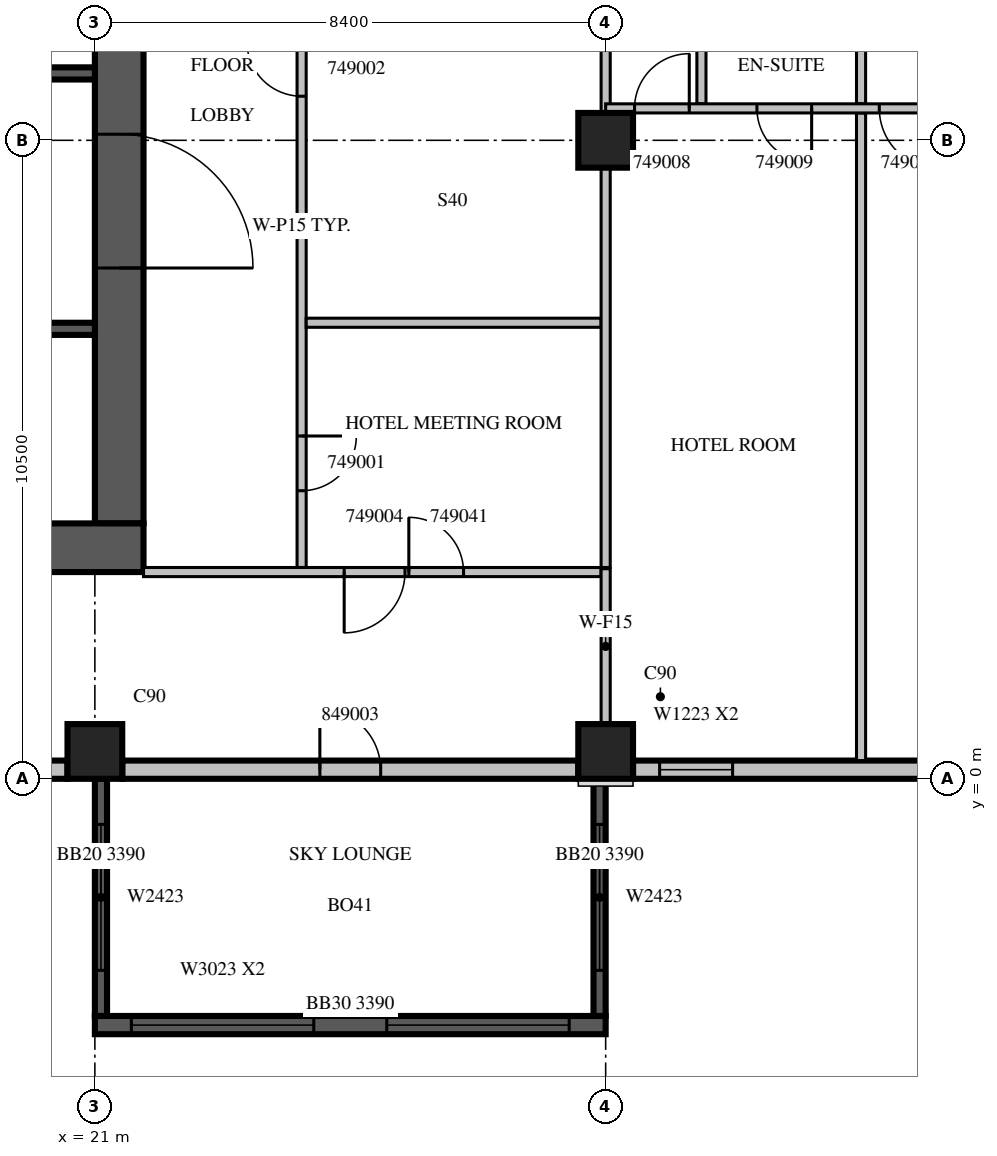
"""IFC4 building model, lengths in metres.
Left out: names, types, materials, properties, quantities, classifications, styles, units other than length and angle.
Written with IfcOpenShell. Run it as: python <this file> out.ifc"""

import sys

from ifc_helpers import new_model, si_unit, direction, frame, frame_2d, origin, origin_2d, place, context, subcontext, project, spatial, rectangle, extrude, source, transform, mapped, element, fill, save


model = new_model("IFC4")
c1 = context("Model", 3, precision=1e-05, world=origin(), true_north=direction((0.0, 1.0)))
c2 = subcontext(c1, "Body", "Model", "MODEL_VIEW")
j1 = project(units=[si_unit("LENGTHUNIT", "METRE"), si_unit("PLANEANGLEUNIT", "RADIAN")], contexts=[c1])
p1 = place(None, origin())
s1 = spatial("IfcSite", under=j1, at=p1, CompositionType="ELEMENT")
p2 = place(p1, origin())
s2 = spatial("IfcBuilding", under=s1, at=p2, CompositionType="ELEMENT")
p3 = place(p2, frame((0.0, 0.0, 219.6)))
s3 = spatial("IfcBuildingStorey", under=s2, at=p3, CompositionType="ELEMENT", Elevation=219.6)
m1 = source(origin(), c2, "Body", "SweptSolid", [
    extrude(rectangle(XDim=0.9, YDim=0.9, at=origin_2d()), origin(), (0.0, 0.0, 1.0), 3.8),
])
for number, where, z_axis, x_axis in (
    (1, (21.0, 0.45, 0.0), (0.0, 0.0, 1.0), (1.0, 0.0, 0.0)),
    (2, (29.4, 0.45, 0.0), (0.0, 0.0, 1.0), (1.0, 0.0, 0.0)),
    (3, (29.4, 10.5, 0.0), (0.0, 0.0, 1.0), (1.0, 0.0, 0.0)),
):
    element("IfcColumn", number, at=place(p3, frame(where, z_axis=z_axis, x_axis=x_axis)), inside=s3, PredefinedType="COLUMN", context=c2, shape_type="MappedRepresentation", body=[
        mapped(m1, transform((0.0, 0.0, 0.0), scale=1.0)),
    ])
m2 = source(origin(), c2, "Body", "SweptSolid", [
    extrude(rectangle(XDim=16.8, YDim=0.8, at=frame_2d((8.4, 0.0))), origin(), (0.0, 0.0, 1.0), 3.8),
])
p4 = place(p3, frame((21.4, 4.2, 0.0), z_axis=(0.0, 0.0, 1.0), x_axis=(0.0, 1.0, 0.0)))
e4 = element("IfcWall", 4, at=p4, inside=s3, PredefinedType="SHEAR", context=c2, shape_type="MappedRepresentation", body=[
    mapped(m2, transform((0.0, 0.0, 0.0), scale=1.0)),
])
m3 = source(origin(), c2, "Body", "SweptSolid", [
    extrude(rectangle(XDim=2.2, YDim=2.1, at=frame_2d((1.1, 1.05))), frame((0.0, 0.41, 0.0), z_axis=(0.0, -1.0, 0.0), x_axis=(1.0, 0.0, 0.0)), (0.0, 0.0, 1.0), 0.82),
])
p5 = place(p4, frame((4.2, 0.0, 0.0)))
e5 = element("IfcOpeningElement", 5, at=p5, cuts=e4, PredefinedType="OPENING", context=c2, shape_type="MappedRepresentation", body=[
    mapped(m3, transform((0.0, 0.0, 0.0), scale=1.0)),
])
m4 = source(origin(), c2, "Body", "SweptSolid", [
    extrude(rectangle(XDim=1.2, YDim=2.1, at=frame_2d((0.6, 1.05))), frame((0.0, 0.41, 0.0), z_axis=(0.0, -1.0, 0.0), x_axis=(1.0, 0.0, 0.0)), (0.0, 0.0, 1.0), 0.82),
])
p6 = place(p4, frame((14.7, 0.0, 0.0)))
e6 = element("IfcOpeningElement", 6, at=p6, cuts=e4, PredefinedType="OPENING", context=c2, shape_type="MappedRepresentation", body=[
    mapped(m4, transform((0.0, 0.0, 0.0), scale=1.0)),
])
m5 = source(origin(), c2, "Body", "SweptSolid", [
    extrude(rectangle(XDim=17.6, YDim=0.8, at=frame_2d((8.8, 0.0))), origin(), (0.0, 0.0, 1.0), 3.8),
])
p7 = place(p3, frame((4.2, 3.8, 0.0), z_axis=(0.0, 0.0, 1.0), x_axis=(1.0, 0.0, 0.0)))
e7 = element("IfcWall", 7, at=p7, inside=s3, PredefinedType="SHEAR", context=c2, shape_type="MappedRepresentation", body=[
    mapped(m5, transform((0.0, 0.0, 0.0), scale=1.0)),
])
m6 = source(origin(), c2, "Body", "SweptSolid", [
    extrude(rectangle(XDim=0.9, YDim=2.1, at=frame_2d((0.45, 1.05))), frame((0.0, 0.41, 0.0), z_axis=(0.0, -1.0, 0.0), x_axis=(1.0, 0.0, 0.0)), (0.0, 0.0, 1.0), 0.82),
])
p8 = place(p7, frame((12.75, 0.0, 0.0)))
e8 = element("IfcOpeningElement", 8, at=p8, cuts=e7, PredefinedType="OPENING", context=c2, shape_type="MappedRepresentation", body=[
    mapped(m6, transform((0.0, 0.0, 0.0), scale=1.0)),
])
m7 = source(origin(), c2, "Body", "SweptSolid", [
    extrude(rectangle(XDim=9.6, YDim=0.3, at=frame_2d((4.8, 0.0))), origin(), (0.0, 0.0, 1.0), 3.4),
])
p9 = place(p3, frame((10.95, 0.15, 0.0), z_axis=(0.0, 0.0, 1.0), x_axis=(1.0, 0.0, 0.0)))
e9 = element("IfcWall", 9, at=p9, inside=s3, PredefinedType="STANDARD", context=c2, shape_type="MappedRepresentation", body=[
    mapped(m7, transform((0.0, 0.0, 0.0), scale=1.0)),
])
m8 = source(origin(), c2, "Body", "SweptSolid", [
    extrude(rectangle(XDim=3.6, YDim=2.3, at=frame_2d((1.8, 1.15))), frame((0.0, 0.16, 0.0), z_axis=(0.0, -1.0, 0.0), x_axis=(1.0, 0.0, 0.0)), (0.0, 0.0, 1.0), 0.32),
])
p10 = place(p9, frame((5.625, 0.0, 0.6)))
e10 = element("IfcOpeningElement", 10, at=p10, cuts=e9, PredefinedType="OPENING", context=c2, shape_type="MappedRepresentation", body=[
    mapped(m8, transform((0.0, 0.0, 0.0), scale=1.0)),
])
m9 = source(origin(), c2, "Body", "SweptSolid", [
    extrude(rectangle(XDim=1.0, YDim=2.1, at=frame_2d((0.5, 1.05))), frame((0.0, 0.16, 0.0), z_axis=(0.0, -1.0, 0.0), x_axis=(1.0, 0.0, 0.0)), (0.0, 0.0, 1.0), 0.32),
])
p11 = place(p9, frame((1.675, 0.0, 0.0)))
e11 = element("IfcOpeningElement", 11, at=p11, cuts=e9, PredefinedType="OPENING", context=c2, shape_type="MappedRepresentation", body=[
    mapped(m9, transform((0.0, 0.0, 0.0), scale=1.0)),
])
m10 = source(origin(), c2, "Body", "SweptSolid", [
    extrude(rectangle(XDim=7.5, YDim=0.3, at=frame_2d((3.75, 0.0))), origin(), (0.0, 0.0, 1.0), 3.4),
])
p12 = place(p3, frame((21.45, 0.15, 0.0), z_axis=(0.0, 0.0, 1.0), x_axis=(1.0, 0.0, 0.0)))
e12 = element("IfcWall", 12, at=p12, inside=s3, PredefinedType="STANDARD", context=c2, shape_type="MappedRepresentation", body=[
    mapped(m10, transform((0.0, 0.0, 0.0), scale=1.0)),
])
p13 = place(p12, frame((3.25, 0.0, 0.0)))
e13 = element("IfcOpeningElement", 13, at=p13, cuts=e12, PredefinedType="OPENING", context=c2, shape_type="MappedRepresentation", body=[
    mapped(m9, transform((0.0, 0.0, 0.0), scale=1.0)),
])
p14 = place(p3, frame((29.85, 0.15, 0.0), z_axis=(0.0, 0.0, 1.0), x_axis=(1.0, 0.0, 0.0)))
e14 = element("IfcWall", 14, at=p14, inside=s3, PredefinedType="STANDARD", context=c2, shape_type="MappedRepresentation", body=[
    mapped(m10, transform((0.0, 0.0, 0.0), scale=1.0)),
])
m11 = source(origin(), c2, "Body", "SweptSolid", [
    extrude(rectangle(XDim=1.2, YDim=2.3, at=frame_2d((0.6, 1.15))), frame((0.0, 0.16, 0.0), z_axis=(0.0, -1.0, 0.0), x_axis=(1.0, 0.0, 0.0)), (0.0, 0.0, 1.0), 0.32),
])
p15 = place(p14, frame((0.438, 0.0, 0.6)))
e15 = element("IfcOpeningElement", 15, at=p15, cuts=e14, PredefinedType="OPENING", context=c2, shape_type="MappedRepresentation", body=[
    mapped(m11, transform((0.0, 0.0, 0.0), scale=1.0)),
])
p16 = place(p14, frame((5.963, 0.0, 0.6)))
e16 = element("IfcOpeningElement", 16, at=p16, cuts=e14, PredefinedType="OPENING", context=c2, shape_type="MappedRepresentation", body=[
    mapped(m11, transform((0.0, 0.0, 0.0), scale=1.0)),
])
p17 = place(p3, frame((21.0, -4.05, 0.0), z_axis=(0.0, 0.0, 1.0), x_axis=(1.0, 0.0, 0.0)))
e17 = element("IfcWall", 17, at=p17, inside=s3, PredefinedType="SOLIDWALL", context=c2, shape_type="SweptSolid", body=[
    extrude(rectangle(XDim=8.4, YDim=0.3, at=frame_2d((4.2, 0.0))), origin(), (0.0, 0.0, 1.0), 3.39),
])
m12 = source(origin(), c2, "Body", "SweptSolid", [
    extrude(rectangle(XDim=3.0, YDim=2.3, at=frame_2d((1.5, 1.15))), frame((0.0, 0.16, 0.0), z_axis=(0.0, -1.0, 0.0), x_axis=(1.0, 0.0, 0.0)), (0.0, 0.0, 1.0), 0.32),
])
p18 = place(p17, frame((0.6, 0.0, 0.6)))
e18 = element("IfcOpeningElement", 18, at=p18, cuts=e17, PredefinedType="OPENING", context=c2, shape_type="MappedRepresentation", body=[
    mapped(m12, transform((0.0, 0.0, 0.0), scale=1.0)),
])
p19 = place(p17, frame((4.8, 0.0, 0.6)))
e19 = element("IfcOpeningElement", 19, at=p19, cuts=e17, PredefinedType="OPENING", context=c2, shape_type="MappedRepresentation", body=[
    mapped(m12, transform((0.0, 0.0, 0.0), scale=1.0)),
])
m13 = source(origin(), c2, "Body", "SweptSolid", [
    extrude(rectangle(XDim=3.9, YDim=0.2, at=frame_2d((1.95, 0.0))), origin(), (0.0, 0.0, 1.0), 3.39),
])
p20 = place(p3, frame((21.1, 0.0, 0.0), z_axis=(0.0, 0.0, 1.0), x_axis=(0.0, -1.0, 0.0)))
e20 = element("IfcWall", 20, at=p20, inside=s3, PredefinedType="SOLIDWALL", context=c2, shape_type="MappedRepresentation", body=[
    mapped(m13, transform((0.0, 0.0, 0.0), scale=1.0)),
])
m14 = source(origin(), c2, "Body", "SweptSolid", [
    extrude(rectangle(XDim=2.4, YDim=2.3, at=frame_2d((1.2, 1.15))), frame((0.0, 0.11, 0.0), z_axis=(0.0, -1.0, 0.0), x_axis=(1.0, 0.0, 0.0)), (0.0, 0.0, 1.0), 0.22),
])
p21 = place(p20, frame((0.75, 0.0, 0.6)))
e21 = element("IfcOpeningElement", 21, at=p21, cuts=e20, PredefinedType="OPENING", context=c2, shape_type="MappedRepresentation", body=[
    mapped(m14, transform((0.0, 0.0, 0.0), scale=1.0)),
])
p22 = place(p3, frame((29.3, 0.0, 0.0), z_axis=(0.0, 0.0, 1.0), x_axis=(0.0, -1.0, 0.0)))
e22 = element("IfcWall", 22, at=p22, inside=s3, PredefinedType="SOLIDWALL", context=c2, shape_type="MappedRepresentation", body=[
    mapped(m13, transform((0.0, 0.0, 0.0), scale=1.0)),
])
p23 = place(p22, frame((0.75, 0.0, 0.6)))
e23 = element("IfcOpeningElement", 23, at=p23, cuts=e22, PredefinedType="OPENING", context=c2, shape_type="MappedRepresentation", body=[
    mapped(m14, transform((0.0, 0.0, 0.0), scale=1.0)),
])
m15 = source(origin(), c2, "Body", "SweptSolid", [
    extrude(rectangle(XDim=2.4, YDim=0.2, at=frame_2d((1.2, 0.0))), origin(), (0.0, 0.0, 1.0), 3.8),
])
p24 = place(p3, frame((18.6, 7.4, 0.0), z_axis=(0.0, 0.0, 1.0), x_axis=(1.0, 0.0, 0.0)))
e24 = element("IfcWall", 24, at=p24, inside=s3, PredefinedType="SOLIDWALL", context=c2, shape_type="MappedRepresentation", body=[
    mapped(m15, transform((0.0, 0.0, 0.0), scale=1.0)),
])
m16 = source(origin(), c2, "Body", "SweptSolid", [
    extrude(rectangle(XDim=9.6, YDim=0.2, at=frame_2d((4.8, 0.0))), origin(), (0.0, 0.0, 1.0), 3.8),
])
p25 = place(p3, frame((11.4, 11.6, 0.0), z_axis=(0.0, 0.0, 1.0), x_axis=(1.0, 0.0, 0.0)))
e25 = element("IfcWall", 25, at=p25, inside=s3, PredefinedType="SOLIDWALL", context=c2, shape_type="MappedRepresentation", body=[
    mapped(m16, transform((0.0, 0.0, 0.0), scale=1.0)),
])
m17 = source(origin(), c2, "Body", "SweptSolid", [
    extrude(rectangle(XDim=11.225, YDim=0.15, at=frame_2d((5.612, 0.0))), origin(), (0.0, 0.0, 1.0), 3.4),
])
p26 = place(p3, frame((24.4, 14.7, 0.0), z_axis=(0.0, 0.0, 1.0), x_axis=(0.0, -1.0, 0.0)))
e26 = element("IfcWall", 26, at=p26, inside=s3, PredefinedType="PARTITIONING", context=c2, shape_type="MappedRepresentation", body=[
    mapped(m17, transform((0.0, 0.0, 0.0), scale=1.0)),
])
m18 = source(origin(), c2, "Body", "SweptSolid", [
    extrude(rectangle(XDim=0.9, YDim=2.1, at=frame_2d((0.45, 1.05))), frame((0.0, 0.085, 0.0), z_axis=(0.0, -1.0, 0.0), x_axis=(1.0, 0.0, 0.0)), (0.0, 0.0, 1.0), 0.17),
])
p27 = place(p26, frame((9.062, 0.0, 0.0)))
e27 = element("IfcOpeningElement", 27, at=p27, cuts=e26, PredefinedType="OPENING", context=c2, shape_type="MappedRepresentation", body=[
    mapped(m18, transform((0.0, 0.0, 0.0), scale=1.0)),
])
p28 = place(p26, frame((2.575, 0.0, 0.0)))
e28 = element("IfcOpeningElement", 28, at=p28, cuts=e26, PredefinedType="OPENING", context=c2, shape_type="MappedRepresentation", body=[
    mapped(m18, transform((0.0, 0.0, 0.0), scale=1.0)),
])
m19 = source(origin(), c2, "Body", "SweptSolid", [
    extrude(rectangle(XDim=4.85, YDim=0.15, at=frame_2d((2.425, 0.0))), origin(), (0.0, 0.0, 1.0), 3.4),
])
p29 = place(p3, frame((29.325, 7.5, 0.0), z_axis=(0.0, 0.0, 1.0), x_axis=(-1.0, 0.0, 0.0)))
e29 = element("IfcWall", 29, at=p29, inside=s3, PredefinedType="PARTITIONING", context=c2, shape_type="MappedRepresentation", body=[
    mapped(m19, transform((0.0, 0.0, 0.0), scale=1.0)),
])
m20 = source(origin(), c2, "Body", "SweptSolid", [
    extrude(rectangle(XDim=6.576, YDim=0.15, at=frame_2d((3.288, 0.0))), origin(), (0.0, 0.0, 1.0), 3.4),
])
p30 = place(p3, frame((29.4, 3.475, 0.0), z_axis=(0.0, 0.0, 1.0), x_axis=(0.0, 1.0, 0.0)))
e30 = element("IfcWall", 30, at=p30, inside=s3, PredefinedType="PARTITIONING", context=c2, shape_type="MappedRepresentation", body=[
    mapped(m20, transform((0.0, 0.0, 0.0), scale=1.0)),
])
m21 = source(origin(), c2, "Body", "SweptSolid", [
    extrude(rectangle(XDim=3.751, YDim=0.15, at=frame_2d((1.875, 0.0))), origin(), (0.0, 0.0, 1.0), 3.4),
])
p31 = place(p3, frame((29.4, 10.949, 0.0), z_axis=(0.0, 0.0, 1.0), x_axis=(0.0, 1.0, 0.0)))
e31 = element("IfcWall", 31, at=p31, inside=s3, PredefinedType="PARTITIONING", context=c2, shape_type="MappedRepresentation", body=[
    mapped(m21, transform((0.0, 0.0, 0.0), scale=1.0)),
])
m22 = source(origin(), c2, "Body", "SweptSolid", [
    extrude(rectangle(XDim=7.525, YDim=0.15, at=frame_2d((3.763, 0.0))), origin(), (0.0, 0.0, 1.0), 3.4),
])
p32 = place(p3, frame((21.8, 3.4, 0.0), z_axis=(0.0, 0.0, 1.0), x_axis=(1.0, 0.0, 0.0)))
e32 = element("IfcWall", 32, at=p32, inside=s3, PredefinedType="PARTITIONING", context=c2, shape_type="MappedRepresentation", body=[
    mapped(m22, transform((0.0, 0.0, 0.0), scale=1.0)),
])
m23 = source(origin(), c2, "Body", "SweptSolid", [
    extrude(rectangle(XDim=1.0, YDim=2.1, at=frame_2d((0.5, 1.05))), frame((0.0, 0.085, 0.0), z_axis=(0.0, -1.0, 0.0), x_axis=(1.0, 0.0, 0.0)), (0.0, 0.0, 1.0), 0.17),
])
p33 = place(p32, frame((3.3, 0.0, 0.0)))
e33 = element("IfcOpeningElement", 33, at=p33, cuts=e32, PredefinedType="OPENING", context=c2, shape_type="MappedRepresentation", body=[
    mapped(m23, transform((0.0, 0.0, 0.0), scale=1.0)),
])
p34 = place(p32, frame((4.363, 0.0, 0.0)))
e34 = element("IfcOpeningElement", 34, at=p34, cuts=e32, PredefinedType="OPENING", context=c2, shape_type="MappedRepresentation", body=[
    mapped(m18, transform((0.0, 0.0, 0.0), scale=1.0)),
])
m24 = source(origin(), c2, "Body", "SweptSolid", [
    extrude(rectangle(XDim=10.65, YDim=0.15, at=frame_2d((5.325, 0.0))), origin(), (0.0, 0.0, 1.0), 3.4),
])
p35 = place(p3, frame((33.6, 0.3, 0.0), z_axis=(0.0, 0.0, 1.0), x_axis=(0.0, 1.0, 0.0)))
e35 = element("IfcWall", 35, at=p35, inside=s3, PredefinedType="PARTITIONING", context=c2, shape_type="MappedRepresentation", body=[
    mapped(m24, transform((0.0, 0.0, 0.0), scale=1.0)),
])
m25 = source(origin(), c2, "Body", "SweptSolid", [
    extrude(rectangle(XDim=3.6, YDim=0.15, at=frame_2d((1.8, 0.0))), origin(), (0.0, 0.0, 1.0), 3.4),
])
for number, where, z_axis, x_axis in (
    (36, (30.975, 11.1, 0.0), (0.0, 0.0, 1.0), (0.0, 1.0, 0.0)),
    (37, (33.6, 11.1, 0.0), (0.0, 0.0, 1.0), (0.0, 1.0, 0.0)),
):
    element("IfcWall", number, at=place(p3, frame(where, z_axis=z_axis, x_axis=x_axis)), inside=s3, PredefinedType="PARTITIONING", context=c2, shape_type="MappedRepresentation", body=[
        mapped(m25, transform((0.0, 0.0, 0.0), scale=1.0)),
    ])
m26 = source(origin(), c2, "Body", "SweptSolid", [
    extrude(rectangle(XDim=2.556, YDim=0.15, at=frame_2d((1.278, 0.0))), origin(), (0.0, 0.0, 1.0), 3.4),
])
p36 = place(p3, frame((29.4, 0.899, 0.0), z_axis=(0.0, 0.0, 1.0), x_axis=(0.0, 1.0, 0.0)))
e38 = element("IfcWall", 38, at=p36, inside=s3, PredefinedType="PARTITIONING", context=c2, shape_type="MappedRepresentation", body=[
    mapped(m26, transform((0.0, 0.0, 0.0), scale=1.0)),
])
m27 = source(origin(), c2, "Body", "SweptSolid", [
    extrude(rectangle(XDim=8.4, YDim=0.15, at=frame_2d((4.2, 0.0))), origin(), (0.0, 0.0, 1.0), 3.4),
])
p37 = place(p3, frame((37.8, 11.025, 0.0), z_axis=(0.0, 0.0, 1.0), x_axis=(-1.0, 0.0, 0.0)))
e39 = element("IfcWall", 39, at=p37, inside=s3, PredefinedType="PARTITIONING", context=c2, shape_type="MappedRepresentation", body=[
    mapped(m27, transform((0.0, 0.0, 0.0), scale=1.0)),
])
p38 = place(p37, frame((7.025, 0.0, 0.0)))
e40 = element("IfcOpeningElement", 40, at=p38, cuts=e39, PredefinedType="OPENING", context=c2, shape_type="MappedRepresentation", body=[
    mapped(m18, transform((0.0, 0.0, 0.0), scale=1.0)),
])
p39 = place(p37, frame((5.013, 0.0, 0.0)))
e41 = element("IfcOpeningElement", 41, at=p39, cuts=e39, PredefinedType="OPENING", context=c2, shape_type="MappedRepresentation", body=[
    mapped(m18, transform((0.0, 0.0, 0.0), scale=1.0)),
])
p40 = place(p37, frame((2.9, 0.0, 0.0)))
e42 = element("IfcOpeningElement", 42, at=p40, cuts=e39, PredefinedType="OPENING", context=c2, shape_type="MappedRepresentation", body=[
    mapped(m23, transform((0.0, 0.0, 0.0), scale=1.0)),
])
p41 = place(p37, frame((1.087, 0.0, 0.0)))
e43 = element("IfcOpeningElement", 43, at=p41, cuts=e39, PredefinedType="OPENING", context=c2, shape_type="MappedRepresentation", body=[
    mapped(m18, transform((0.0, 0.0, 0.0), scale=1.0)),
])
m28 = source(origin(), c2, "Body", "SweptSolid", [
    extrude(rectangle(XDim=1.2, YDim=2.3, at=frame_2d((0.6, 1.15))), frame((0.0, 0.03, 0.0), z_axis=(0.0, -1.0, 0.0), x_axis=(1.0, 0.0, 0.0)), (0.0, 0.0, 1.0), 0.06),
])
p42 = place(p15, origin())
e44 = element("IfcWindow", 44, at=p42, inside=s3, PartitioningType="SINGLE_PANEL", PredefinedType="WINDOW", context=c2, shape_type="MappedRepresentation", body=[
    mapped(m28, transform((0.0, 0.0, 0.0), scale=1.0)),
])
fill(e15, e44)
m29 = source(origin(), c2, "Body", "SweptSolid", [
    extrude(rectangle(XDim=3.0, YDim=2.3, at=frame_2d((1.5, 1.15))), frame((0.0, 0.03, 0.0), z_axis=(0.0, -1.0, 0.0), x_axis=(1.0, 0.0, 0.0)), (0.0, 0.0, 1.0), 0.06),
])
p43 = place(p18, origin())
e45 = element("IfcWindow", 45, at=p43, inside=s3, PartitioningType="SINGLE_PANEL", PredefinedType="WINDOW", context=c2, shape_type="MappedRepresentation", body=[
    mapped(m29, transform((0.0, 0.0, 0.0), scale=1.0)),
])
fill(e18, e45)
p44 = place(p19, origin())
e46 = element("IfcWindow", 46, at=p44, inside=s3, PartitioningType="SINGLE_PANEL", PredefinedType="WINDOW", context=c2, shape_type="MappedRepresentation", body=[
    mapped(m29, transform((0.0, 0.0, 0.0), scale=1.0)),
])
fill(e19, e46)
m30 = source(origin(), c2, "Body", "SweptSolid", [
    extrude(rectangle(XDim=2.4, YDim=2.3, at=frame_2d((1.2, 1.15))), frame((0.0, 0.03, 0.0), z_axis=(0.0, -1.0, 0.0), x_axis=(1.0, 0.0, 0.0)), (0.0, 0.0, 1.0), 0.06),
])
p45 = place(p21, origin())
e47 = element("IfcWindow", 47, at=p45, inside=s3, PartitioningType="SINGLE_PANEL", PredefinedType="WINDOW", context=c2, shape_type="MappedRepresentation", body=[
    mapped(m30, transform((0.0, 0.0, 0.0), scale=1.0)),
])
fill(e21, e47)
p46 = place(p23, origin())
e48 = element("IfcWindow", 48, at=p46, inside=s3, PartitioningType="SINGLE_PANEL", PredefinedType="WINDOW", context=c2, shape_type="MappedRepresentation", body=[
    mapped(m30, transform((0.0, 0.0, 0.0), scale=1.0)),
])
fill(e23, e48)
m31 = source(origin(), c2, "Body", "SweptSolid", [
    extrude(rectangle(XDim=2.2, YDim=2.1, at=frame_2d((1.1, 1.05))), frame((0.0, 0.025, 0.0), z_axis=(0.0, -1.0, 0.0), x_axis=(1.0, 0.0, 0.0)), (0.0, 0.0, 1.0), 0.05),
])
p47 = place(p5, origin())
e49 = element("IfcDoor", 49, at=p47, inside=s3, OperationType="DOUBLE_DOOR_SINGLE_SWING", PredefinedType="DOOR", context=c2, shape_type="MappedRepresentation", body=[
    mapped(m31, transform((0.0, 0.0, 0.0), scale=1.0)),
])
fill(e5, e49)
m32 = source(origin(), c2, "Body", "SweptSolid", [
    extrude(rectangle(XDim=0.9, YDim=2.1, at=frame_2d((0.45, 1.05))), frame((0.0, 0.025, 0.0), z_axis=(0.0, -1.0, 0.0), x_axis=(1.0, 0.0, 0.0)), (0.0, 0.0, 1.0), 0.05),
])
p48 = place(p27, origin())
e50 = element("IfcDoor", 50, at=p48, inside=s3, OperationType="SINGLE_SWING_LEFT", PredefinedType="DOOR", context=c2, shape_type="MappedRepresentation", body=[
    mapped(m32, transform((0.0, 0.0, 0.0), scale=1.0)),
])
fill(e27, e50)
p49 = place(p28, origin())
e51 = element("IfcDoor", 51, at=p49, inside=s3, OperationType="SINGLE_SWING_RIGHT", PredefinedType="DOOR", context=c2, shape_type="MappedRepresentation", body=[
    mapped(m32, transform((0.0, 0.0, 0.0), scale=1.0)),
])
fill(e28, e51)
m33 = source(origin(), c2, "Body", "SweptSolid", [
    extrude(rectangle(XDim=1.0, YDim=2.1, at=frame_2d((0.5, 1.05))), frame((0.0, 0.025, 0.0), z_axis=(0.0, -1.0, 0.0), x_axis=(1.0, 0.0, 0.0)), (0.0, 0.0, 1.0), 0.05),
])
p50 = place(p33, origin())
e52 = element("IfcDoor", 52, at=p50, inside=s3, OperationType="SINGLE_SWING_RIGHT", PredefinedType="DOOR", context=c2, shape_type="MappedRepresentation", body=[
    mapped(m33, transform((0.0, 0.0, 0.0), scale=1.0)),
])
fill(e33, e52)
p51 = place(p38, origin())
e53 = element("IfcDoor", 53, at=p51, inside=s3, OperationType="SINGLE_SWING_RIGHT", PredefinedType="DOOR", context=c2, shape_type="MappedRepresentation", body=[
    mapped(m32, transform((0.0, 0.0, 0.0), scale=1.0)),
])
fill(e40, e53)
p52 = place(p39, origin())
e54 = element("IfcDoor", 54, at=p52, inside=s3, OperationType="SINGLE_SWING_LEFT", PredefinedType="DOOR", context=c2, shape_type="MappedRepresentation", body=[
    mapped(m32, transform((0.0, 0.0, 0.0), scale=1.0)),
])
fill(e41, e54)
p53 = place(p40, origin())
e55 = element("IfcDoor", 55, at=p53, inside=s3, OperationType="SINGLE_SWING_LEFT", PredefinedType="DOOR", context=c2, shape_type="MappedRepresentation", body=[
    mapped(m33, transform((0.0, 0.0, 0.0), scale=1.0)),
])
fill(e42, e55)
p54 = place(p34, origin())
e56 = element("IfcDoor", 56, at=p54, inside=s3, OperationType="SINGLE_SWING_LEFT", PredefinedType="DOOR", context=c2, shape_type="MappedRepresentation", body=[
    mapped(m32, transform((0.0, 0.0, 0.0), scale=1.0)),
])
fill(e34, e56)
p55 = place(p13, origin())
e57 = element("IfcDoor", 57, at=p55, inside=s3, OperationType="SINGLE_SWING_LEFT", PredefinedType="DOOR", context=c2, shape_type="MappedRepresentation", body=[
    mapped(m33, transform((0.0, 0.0, 0.0), scale=1.0)),
])
fill(e13, e57)
save(model, sys.argv[1])
